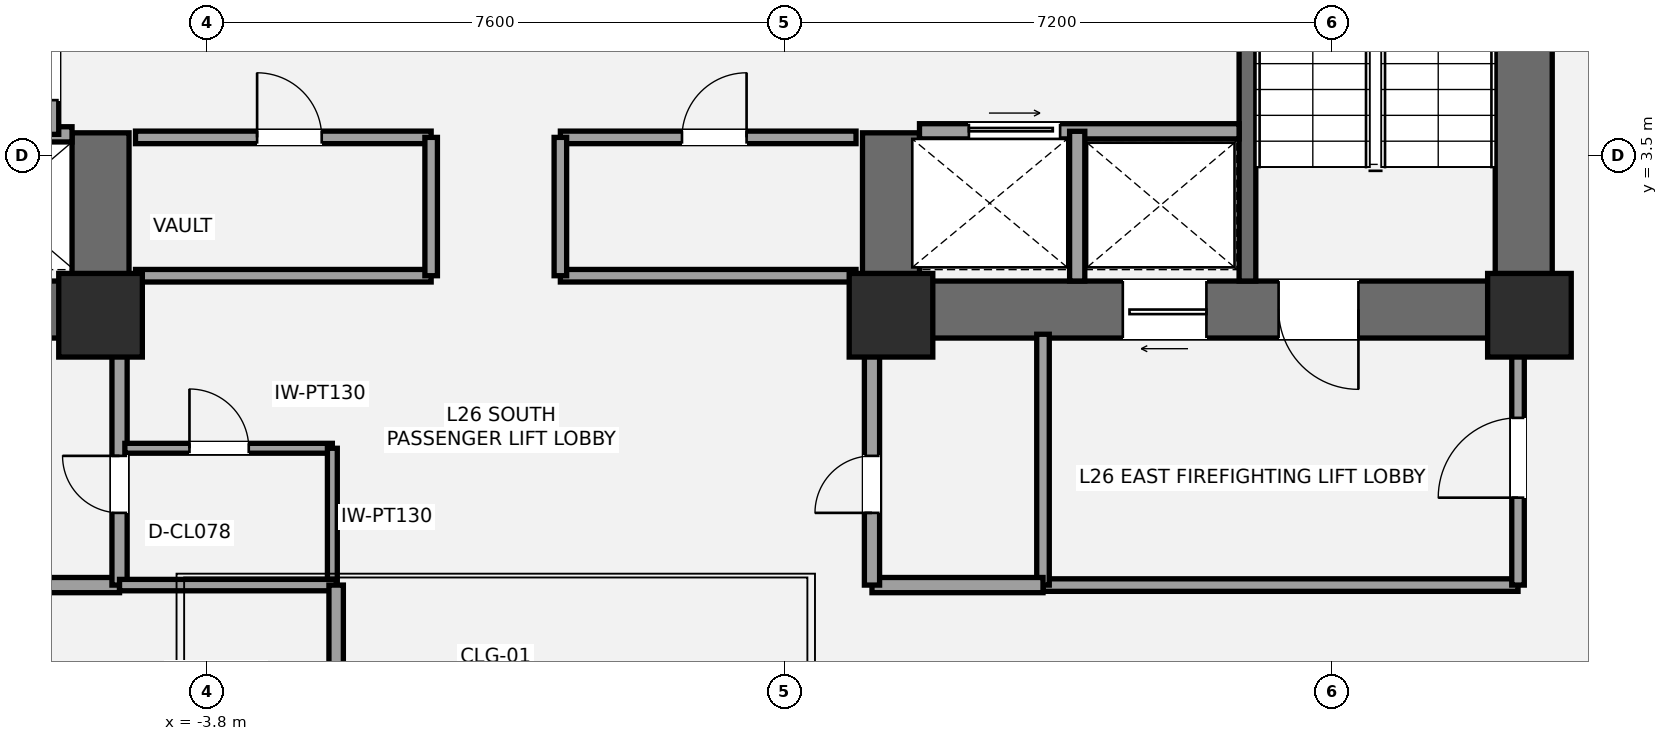
"""IFC4 building model, lengths in metres.
Left out: names, types, materials, properties, quantities, classifications, styles, units other than length and angle.
Written with IfcOpenShell. Run it as: python <this file> out.ifc"""

import sys

from ifc_helpers import new_model, si_unit, direction, frame, frame_2d, origin, origin_2d, place, context, subcontext, project, spatial, rectangle, extrude, element, fill, save


model = new_model("IFC4")
c1 = context("Model", 3, precision=1e-05, world=origin(), true_north=direction((0.0, 1.0)))
c2 = subcontext(c1, "Body", "Model", "MODEL_VIEW")
j1 = project(units=[si_unit("LENGTHUNIT", "METRE"), si_unit("PLANEANGLEUNIT", "RADIAN")], contexts=[c1])
p1 = place(None, origin())
s1 = spatial("IfcSite", under=j1, at=p1, CompositionType="ELEMENT")
p2 = place(p1, origin())
s2 = spatial("IfcBuilding", under=s1, at=p2, CompositionType="ELEMENT")
p3 = place(p2, frame((0.0, 0.0, 100.1)))
s3 = spatial("IfcBuildingStorey", under=s2, at=p3, CompositionType="ELEMENT", Elevation=100.1)
p4 = place(p3, frame((-4.825, 1.475, 0.0), z_axis=(0.0, 0.0, 1.0), x_axis=(-1.0, 0.0, 0.0)))
e1 = element("IfcWall", 1, at=p4, inside=s3, PredefinedType="SHEAR", context=c2, shape_type="SweptSolid", body=[
    extrude(rectangle(XDim=9.075, YDim=0.75, at=frame_2d((4.538, 0.0))), origin(), (0.0, 0.0, 1.0), 3.5),
])
p5 = place(p4, frame((5.475, 0.0, 0.0)))
e2 = element("IfcOpeningElement", 2, at=p5, cuts=e1, PredefinedType="OPENING", context=c2, shape_type="SweptSolid", body=[
    extrude(rectangle(XDim=1.05, YDim=2.15, at=frame_2d((0.525, 1.075))), frame((0.0, 0.385, 0.0), z_axis=(0.0, -1.0, 0.0), x_axis=(1.0, 0.0, 0.0)), (0.0, 0.0, 1.0), 0.77),
])
p6 = place(p4, frame((3.805, 0.0, 0.0)))
e3 = element("IfcOpeningElement", 3, at=p6, cuts=e1, PredefinedType="OPENING", context=c2, shape_type="SweptSolid", body=[
    extrude(rectangle(XDim=1.1, YDim=2.2, at=frame_2d((0.55, 1.1))), frame((0.0, 0.385, 0.0), z_axis=(0.0, -1.0, 0.0), x_axis=(1.0, 0.0, 0.0)), (0.0, 0.0, 1.0), 0.77),
])
p7 = place(p3, frame((-5.2, 1.1, 0.0), z_axis=(0.0, 0.0, 1.0), x_axis=(0.0, 1.0, 0.0)))
e4 = element("IfcWall", 4, at=p7, inside=s3, PredefinedType="SHEAR", context=c2, shape_type="SweptSolid", body=[
    extrude(rectangle(XDim=2.7, YDim=0.75, at=frame_2d((1.35, 0.0))), origin(), (0.0, 0.0, 1.0), 3.5),
])
p8 = place(p3, frame((13.525, 1.1, 0.0), z_axis=(0.0, 0.0, 1.0), x_axis=(0.0, 1.0, 0.0)))
e5 = element("IfcWall", 5, at=p8, inside=s3, PredefinedType="SHEAR", context=c2, shape_type="SweptSolid", body=[
    extrude(rectangle(XDim=8.65, YDim=0.75, at=frame_2d((4.325, 0.0))), origin(), (0.0, 0.0, 1.0), 3.5),
])
p9 = place(p3, frame((13.9, 1.475, 0.0), z_axis=(0.0, 0.0, 1.0), x_axis=(-1.0, 0.0, 0.0)))
e6 = element("IfcWall", 6, at=p9, inside=s3, PredefinedType="SHEAR", context=c2, shape_type="SweptSolid", body=[
    extrude(rectangle(XDim=9.075, YDim=0.75, at=frame_2d((4.538, 0.0))), origin(), (0.0, 0.0, 1.0), 3.5),
])
p10 = place(p9, frame((2.55, 0.0, 0.0)))
e7 = element("IfcOpeningElement", 7, at=p10, cuts=e6, PredefinedType="OPENING", context=c2, shape_type="SweptSolid", body=[
    extrude(rectangle(XDim=1.05, YDim=2.15, at=frame_2d((0.525, 1.075))), frame((0.0, 0.385, 0.0), z_axis=(0.0, -1.0, 0.0), x_axis=(1.0, 0.0, 0.0)), (0.0, 0.0, 1.0), 0.77),
])
p11 = place(p9, frame((4.55, 0.0, 0.0)))
e8 = element("IfcOpeningElement", 8, at=p11, cuts=e6, PredefinedType="OPENING", context=c2, shape_type="SweptSolid", body=[
    extrude(rectangle(XDim=1.1, YDim=2.2, at=frame_2d((0.55, 1.1))), frame((0.0, 0.385, 0.0), z_axis=(0.0, -1.0, 0.0), x_axis=(1.0, 0.0, 0.0)), (0.0, 0.0, 1.0), 0.77),
])
p12 = place(p3, frame((5.2, 1.1, 0.0), z_axis=(0.0, 0.0, 1.0), x_axis=(0.0, 1.0, 0.0)))
e9 = element("IfcWall", 9, at=p12, inside=s3, PredefinedType="SHEAR", context=c2, shape_type="SweptSolid", body=[
    extrude(rectangle(XDim=2.7, YDim=0.75, at=frame_2d((1.35, 0.0))), origin(), (0.0, 0.0, 1.0), 3.5),
])
p13 = place(p3, frame((9.89, 1.85, 0.0), z_axis=(0.0, 0.0, 1.0), x_axis=(0.0, 1.0, 0.0)))
e10 = element("IfcWall", 10, at=p13, inside=s3, PredefinedType="SHEAR", context=c2, shape_type="SweptSolid", body=[
    extrude(rectangle(XDim=7.15, YDim=0.22, at=frame_2d((3.575, 0.0))), origin(), (0.0, 0.0, 1.0), 3.5),
])
for number, where, z_axis, x_axis in (
    (11, (-5.2, 1.4, 0.0), (0.0, 0.0, 1.0), (1.0, 0.0, 0.0)),
    (12, (5.2, 1.4, 0.0), (0.0, 0.0, 1.0), (1.0, 0.0, 0.0)),
    (13, (13.6, 1.4, 0.0), (0.0, 0.0, 1.0), (1.0, 0.0, 0.0)),
):
    element("IfcColumn", number, at=place(p3, frame(where, z_axis=z_axis, x_axis=x_axis)), inside=s3, PredefinedType="COLUMN", context=c2, shape_type="SweptSolid", body=[
        extrude(rectangle(XDim=1.1, YDim=1.1, at=origin_2d()), origin(), (0.0, 0.0, 1.0), 3.5),
    ])
p14 = place(p3, frame((-7.2, -2.15, 0.0), z_axis=(0.0, 0.0, 1.0), x_axis=(1.0, 0.0, 0.0)))
e14 = element("IfcWall", 14, at=p14, inside=s3, PredefinedType="SOLIDWALL", context=c2, shape_type="SweptSolid", body=[
    extrude(rectangle(XDim=2.25, YDim=0.2, at=frame_2d((1.125, 0.0))), origin(), (0.0, 0.0, 1.0), 2.763),
])
p15 = place(p3, frame((-4.95, -2.15, 0.0), z_axis=(0.0, 0.0, 1.0), x_axis=(0.0, 1.0, 0.0)))
e15 = element("IfcWall", 15, at=p15, inside=s3, PredefinedType="SOLIDWALL", context=c2, shape_type="SweptSolid", body=[
    extrude(rectangle(XDim=3.3, YDim=0.2, at=frame_2d((1.65, 0.0))), origin(), (0.0, 0.0, 1.0), 2.763),
])
p16 = place(p15, frame((0.95, 0.0, 0.0)))
e16 = element("IfcOpeningElement", 16, at=p16, cuts=e15, PredefinedType="OPENING", context=c2, shape_type="SweptSolid", body=[
    extrude(rectangle(XDim=0.75, YDim=2.1, at=frame_2d((0.375, 1.05))), frame((0.0, 0.11, 0.0), z_axis=(0.0, -1.0, 0.0), x_axis=(1.0, 0.0, 0.0)), (0.0, 0.0, 1.0), 0.22),
])
p17 = place(p3, frame((7.2, -2.15, 0.0), z_axis=(0.0, 0.0, 1.0), x_axis=(1.0, 0.0, 0.0)))
e17 = element("IfcWall", 17, at=p17, inside=s3, PredefinedType="PARTITIONING", context=c2, shape_type="SweptSolid", body=[
    extrude(rectangle(XDim=6.25, YDim=0.165, at=frame_2d((3.125, 0.0))), origin(), (0.0, 0.0, 1.0), 3.31),
])
p18 = place(p3, frame((7.2, -2.15, 0.0), z_axis=(0.0, 0.0, 1.0), x_axis=(0.0, 1.0, 0.0)))
e18 = element("IfcWall", 18, at=p18, inside=s3, PredefinedType="PARTITIONING", context=c2, shape_type="SweptSolid", body=[
    extrude(rectangle(XDim=3.3, YDim=0.165, at=frame_2d((1.65, 0.0))), origin(), (0.0, 0.0, 1.0), 3.31),
])
p19 = place(p3, frame((13.45, -2.15, 0.0), z_axis=(0.0, 0.0, 1.0), x_axis=(0.0, 1.0, 0.0)))
e19 = element("IfcWall", 19, at=p19, inside=s3, PredefinedType="PARTITIONING", context=c2, shape_type="SweptSolid", body=[
    extrude(rectangle(XDim=3.3, YDim=0.165, at=frame_2d((1.65, 0.0))), origin(), (0.0, 0.0, 1.0), 2.763),
])
p20 = place(p19, frame((1.15, 0.0, 0.0)))
e20 = element("IfcOpeningElement", 20, at=p20, cuts=e19, PredefinedType="OPENING", context=c2, shape_type="SweptSolid", body=[
    extrude(rectangle(XDim=1.05, YDim=2.15, at=frame_2d((0.525, 1.075))), frame((0.0, 0.093, 0.0), z_axis=(0.0, -1.0, 0.0), x_axis=(1.0, 0.0, 0.0)), (0.0, 0.0, 1.0), 0.185),
])
p21 = place(p3, frame((4.95, -2.15, 0.0), z_axis=(0.0, 0.0, 1.0), x_axis=(1.0, 0.0, 0.0)))
e21 = element("IfcWall", 21, at=p21, inside=s3, PredefinedType="SOLIDWALL", context=c2, shape_type="SweptSolid", body=[
    extrude(rectangle(XDim=2.25, YDim=0.2, at=frame_2d((1.125, 0.0))), origin(), (0.0, 0.0, 1.0), 2.763),
])
p22 = place(p3, frame((4.95, -2.15, 0.0), z_axis=(0.0, 0.0, 1.0), x_axis=(0.0, 1.0, 0.0)))
e22 = element("IfcWall", 22, at=p22, inside=s3, PredefinedType="SOLIDWALL", context=c2, shape_type="SweptSolid", body=[
    extrude(rectangle(XDim=3.3, YDim=0.2, at=frame_2d((1.65, 0.0))), origin(), (0.0, 0.0, 1.0), 3.31),
])
p23 = place(p22, frame((0.95, 0.0, 0.0)))
e23 = element("IfcOpeningElement", 23, at=p23, cuts=e22, PredefinedType="OPENING", context=c2, shape_type="SweptSolid", body=[
    extrude(rectangle(XDim=0.75, YDim=2.1, at=frame_2d((0.375, 1.05))), frame((0.0, 0.11, 0.0), z_axis=(0.0, -1.0, 0.0), x_axis=(1.0, 0.0, 0.0)), (0.0, 0.0, 1.0), 0.22),
])
p24 = place(p3, frame((-4.88, -0.35, 0.0), z_axis=(0.0, 0.0, 1.0), x_axis=(1.0, 0.0, 0.0)))
e24 = element("IfcWall", 24, at=p24, inside=s3, PredefinedType="PARTITIONING", context=c2, shape_type="SweptSolid", body=[
    extrude(rectangle(XDim=2.73, YDim=0.13, at=frame_2d((1.365, 0.0))), origin(), (0.0, 0.0, 1.0), 2.763),
])
p25 = place(p24, frame((0.85, 0.0, 0.0)))
e25 = element("IfcOpeningElement", 25, at=p25, cuts=e24, PredefinedType="OPENING", context=c2, shape_type="SweptSolid", body=[
    extrude(rectangle(XDim=0.78, YDim=2.1, at=frame_2d((0.39, 1.05))), frame((0.0, 0.075, 0.0), z_axis=(0.0, -1.0, 0.0), x_axis=(1.0, 0.0, 0.0)), (0.0, 0.0, 1.0), 0.15),
])
p26 = place(p3, frame((-2.15, -2.15, 0.0), z_axis=(0.0, 0.0, 1.0), x_axis=(0.0, 1.0, 0.0)))
e26 = element("IfcWall", 26, at=p26, inside=s3, PredefinedType="PARTITIONING", context=c2, shape_type="SweptSolid", body=[
    extrude(rectangle(XDim=1.8, YDim=0.13, at=frame_2d((0.9, 0.0))), origin(), (0.0, 0.0, 1.0), 3.31),
])
p27 = place(p3, frame((-9.78, 3.78, 0.0), z_axis=(0.0, 0.0, 1.0), x_axis=(1.0, 0.0, 0.0)))
e27 = element("IfcWall", 27, at=p27, inside=s3, PredefinedType="SOLIDWALL", context=c2, shape_type="SweptSolid", body=[
    extrude(rectangle(XDim=4.205, YDim=0.2, at=frame_2d((2.103, 0.0))), origin(), (0.0, 0.0, 1.0), 3.31),
])
p28 = place(p3, frame((-5.85, 3.78, 0.0), z_axis=(0.0, 0.0, 1.0), x_axis=(0.0, 1.0, 0.0)))
e28 = element("IfcWall", 28, at=p28, inside=s3, PredefinedType="SOLIDWALL", context=c2, shape_type="SweptSolid", body=[
    extrude(rectangle(XDim=1.69, YDim=0.2, at=frame_2d((0.845, 0.0))), origin(), (0.0, 0.0, 1.0), 3.31),
])
p29 = place(p28, frame((0.45, 0.0, 0.0)))
e29 = element("IfcOpeningElement", 29, at=p29, cuts=e28, PredefinedType="OPENING", context=c2, shape_type="SweptSolid", body=[
    extrude(rectangle(XDim=0.75, YDim=2.1, at=frame_2d((0.375, 1.05))), frame((0.0, 0.11, 0.0), z_axis=(0.0, -1.0, 0.0), x_axis=(1.0, 0.0, 0.0)), (0.0, 0.0, 1.0), 0.22),
])
p30 = place(p3, frame((5.575, 3.82, 0.0), z_axis=(0.0, 0.0, 1.0), x_axis=(1.0, 0.0, 0.0)))
e30 = element("IfcWall", 30, at=p30, inside=s3, PredefinedType="SOLIDWALL", context=c2, shape_type="SweptSolid", body=[
    extrude(rectangle(XDim=4.205, YDim=0.2, at=frame_2d((2.103, 0.0))), origin(), (0.0, 0.0, 1.0), 3.31),
])
p31 = place(p30, frame((0.65, 0.0, 0.0)))
e31 = element("IfcOpeningElement", 31, at=p31, cuts=e30, PredefinedType="OPENING", context=c2, shape_type="SweptSolid", body=[
    extrude(rectangle(XDim=1.2, YDim=2.2, at=frame_2d((0.6, 1.1))), frame((0.0, 0.11, 0.0), z_axis=(0.0, -1.0, 0.0), x_axis=(1.0, 0.0, 0.0)), (0.0, 0.0, 1.0), 0.22),
])
p32 = place(p3, frame((7.65, 1.85, 0.0), z_axis=(0.0, 0.0, 1.0), x_axis=(0.0, 1.0, 0.0)))
e32 = element("IfcWall", 32, at=p32, inside=s3, PredefinedType="SOLIDWALL", context=c2, shape_type="SweptSolid", body=[
    extrude(rectangle(XDim=1.97, YDim=0.2, at=frame_2d((0.985, 0.0))), origin(), (0.0, 0.0, 1.0), 3.31),
])
p33 = place(p3, frame((-4.74, 1.92, 0.0), z_axis=(0.0, 0.0, 1.0), x_axis=(1.0, 0.0, 0.0)))
e33 = element("IfcWall", 33, at=p33, inside=s3, PredefinedType="PARTITIONING", context=c2, shape_type="SweptSolid", body=[
    extrude(rectangle(XDim=3.89, YDim=0.165, at=frame_2d((1.945, 0.0))), origin(), (0.0, 0.0, 1.0), 2.3),
])
p34 = place(p3, frame((-4.74, 3.74, 0.0), z_axis=(0.0, 0.0, 1.0), x_axis=(1.0, 0.0, 0.0)))
e34 = element("IfcWall", 34, at=p34, inside=s3, PredefinedType="PARTITIONING", context=c2, shape_type="SweptSolid", body=[
    extrude(rectangle(XDim=3.89, YDim=0.165, at=frame_2d((1.945, 0.0))), origin(), (0.0, 0.0, 1.0), 3.31),
])
p35 = place(p34, frame((1.6, 0.0, 0.0)))
e35 = element("IfcOpeningElement", 35, at=p35, cuts=e34, PredefinedType="OPENING", context=c2, shape_type="SweptSolid", body=[
    extrude(rectangle(XDim=0.85, YDim=2.1, at=frame_2d((0.425, 1.05))), frame((0.0, 0.093, 0.0), z_axis=(0.0, -1.0, 0.0), x_axis=(1.0, 0.0, 0.0)), (0.0, 0.0, 1.0), 0.185),
])
p36 = place(p3, frame((-0.85, 1.92, 0.0), z_axis=(0.0, 0.0, 1.0), x_axis=(0.0, 1.0, 0.0)))
e36 = element("IfcWall", 36, at=p36, inside=s3, PredefinedType="PARTITIONING", context=c2, shape_type="SweptSolid", body=[
    extrude(rectangle(XDim=1.82, YDim=0.165, at=frame_2d((0.91, 0.0))), origin(), (0.0, 0.0, 1.0), 3.31),
])
p37 = place(p3, frame((0.85, 1.92, 0.0), z_axis=(0.0, 0.0, 1.0), x_axis=(1.0, 0.0, 0.0)))
e37 = element("IfcWall", 37, at=p37, inside=s3, PredefinedType="PARTITIONING", context=c2, shape_type="SweptSolid", body=[
    extrude(rectangle(XDim=3.89, YDim=0.165, at=frame_2d((1.945, 0.0))), origin(), (0.0, 0.0, 1.0), 2.3),
])
p38 = place(p3, frame((0.85, 3.74, 0.0), z_axis=(0.0, 0.0, 1.0), x_axis=(1.0, 0.0, 0.0)))
e38 = element("IfcWall", 38, at=p38, inside=s3, PredefinedType="PARTITIONING", context=c2, shape_type="SweptSolid", body=[
    extrude(rectangle(XDim=3.89, YDim=0.165, at=frame_2d((1.945, 0.0))), origin(), (0.0, 0.0, 1.0), 3.31),
])
p39 = place(p38, frame((1.6, 0.0, 0.0)))
e39 = element("IfcOpeningElement", 39, at=p39, cuts=e38, PredefinedType="OPENING", context=c2, shape_type="SweptSolid", body=[
    extrude(rectangle(XDim=0.85, YDim=2.1, at=frame_2d((0.425, 1.05))), frame((0.0, 0.093, 0.0), z_axis=(0.0, -1.0, 0.0), x_axis=(1.0, 0.0, 0.0)), (0.0, 0.0, 1.0), 0.185),
])
p40 = place(p3, frame((0.85, 1.92, 0.0), z_axis=(0.0, 0.0, 1.0), x_axis=(0.0, 1.0, 0.0)))
e40 = element("IfcWall", 40, at=p40, inside=s3, PredefinedType="PARTITIONING", context=c2, shape_type="SweptSolid", body=[
    extrude(rectangle(XDim=1.82, YDim=0.165, at=frame_2d((0.91, 0.0))), origin(), (0.0, 0.0, 1.0), 3.31),
])
p41 = place(p3, frame((-4.95, -2.15, 0.0), z_axis=(0.0, 0.0, 1.0), x_axis=(1.0, 0.0, 0.0)))
e41 = element("IfcWall", 41, at=p41, inside=s3, PredefinedType="PLUMBINGWALL", context=c2, shape_type="SweptSolid", body=[
    extrude(rectangle(XDim=2.85, YDim=0.15, at=frame_2d((1.425, 0.0))), origin(), (0.0, 0.0, 1.0), 2.763),
])
p42 = place(p3, frame((-2.1, -4.05, 0.0), z_axis=(0.0, 0.0, 1.0), x_axis=(0.0, 1.0, 0.0)))
e42 = element("IfcWall", 42, at=p42, inside=s3, PredefinedType="PLUMBINGWALL", context=c2, shape_type="SweptSolid", body=[
    extrude(rectangle(XDim=1.9, YDim=0.19, at=frame_2d((0.95, 0.0))), origin(), (0.0, 0.0, 1.0), 3.31),
])
p43 = place(p10, origin())
e43 = element("IfcDoor", 43, at=p43, inside=s3, OperationType="SINGLE_SWING_LEFT", PredefinedType="DOOR", context=c2, shape_type="SweptSolid", body=[
    extrude(rectangle(XDim=1.05, YDim=2.15, at=frame_2d((0.525, 1.075))), frame((0.0, 0.025, 0.0), z_axis=(0.0, -1.0, 0.0), x_axis=(1.0, 0.0, 0.0)), (0.0, 0.0, 1.0), 0.05),
])
fill(e7, e43)
p44 = place(p16, origin())
e44 = element("IfcDoor", 44, at=p44, inside=s3, OperationType="SINGLE_SWING_RIGHT", PredefinedType="DOOR", context=c2, shape_type="SweptSolid", body=[
    extrude(rectangle(XDim=0.75, YDim=2.1, at=frame_2d((0.375, 1.05))), frame((0.0, 0.025, 0.0), z_axis=(0.0, -1.0, 0.0), x_axis=(1.0, 0.0, 0.0)), (0.0, 0.0, 1.0), 0.05),
])
fill(e16, e44)
p45 = place(p20, origin())
e45 = element("IfcDoor", 45, at=p45, inside=s3, OperationType="SINGLE_SWING_LEFT", PredefinedType="DOOR", context=c2, shape_type="SweptSolid", body=[
    extrude(rectangle(XDim=1.05, YDim=2.15, at=frame_2d((0.525, 1.075))), frame((0.0, 0.025, 0.0), z_axis=(0.0, -1.0, 0.0), x_axis=(1.0, 0.0, 0.0)), (0.0, 0.0, 1.0), 0.05),
])
fill(e20, e45)
p46 = place(p23, origin())
e46 = element("IfcDoor", 46, at=p46, inside=s3, OperationType="SINGLE_SWING_LEFT", PredefinedType="DOOR", context=c2, shape_type="SweptSolid", body=[
    extrude(rectangle(XDim=0.75, YDim=2.1, at=frame_2d((0.375, 1.05))), frame((0.0, 0.025, 0.0), z_axis=(0.0, -1.0, 0.0), x_axis=(1.0, 0.0, 0.0)), (0.0, 0.0, 1.0), 0.05),
])
fill(e23, e46)
p47 = place(p25, origin())
e47 = element("IfcDoor", 47, at=p47, inside=s3, OperationType="SINGLE_SWING_LEFT", PredefinedType="DOOR", context=c2, shape_type="SweptSolid", body=[
    extrude(rectangle(XDim=0.78, YDim=2.1, at=frame_2d((0.39, 1.05))), frame((0.0, 0.025, 0.0), z_axis=(0.0, -1.0, 0.0), x_axis=(1.0, 0.0, 0.0)), (0.0, 0.0, 1.0), 0.05),
])
fill(e25, e47)
p48 = place(p29, origin())
e48 = element("IfcDoor", 48, at=p48, inside=s3, OperationType="SINGLE_SWING_RIGHT", PredefinedType="DOOR", context=c2, shape_type="SweptSolid", body=[
    extrude(rectangle(XDim=0.75, YDim=2.1, at=frame_2d((0.375, 1.05))), frame((0.0, 0.025, 0.0), z_axis=(0.0, -1.0, 0.0), x_axis=(1.0, 0.0, 0.0)), (0.0, 0.0, 1.0), 0.05),
])
fill(e29, e48)
p49 = place(p11, origin())
e49 = element("IfcDoor", 49, at=p49, inside=s3, OperationType="SLIDING_TO_LEFT", PredefinedType="DOOR", context=c2, shape_type="SweptSolid", body=[
    extrude(rectangle(XDim=1.1, YDim=2.2, at=frame_2d((0.55, 1.1))), frame((0.0, 0.025, 0.0), z_axis=(0.0, -1.0, 0.0), x_axis=(1.0, 0.0, 0.0)), (0.0, 0.0, 1.0), 0.05),
])
fill(e8, e49)
p50 = place(p31, origin())
e50 = element("IfcDoor", 50, at=p50, inside=s3, OperationType="SLIDING_TO_RIGHT", PredefinedType="DOOR", context=c2, shape_type="SweptSolid", body=[
    extrude(rectangle(XDim=1.2, YDim=2.2, at=frame_2d((0.6, 1.1))), frame((0.0, 0.025, 0.0), z_axis=(0.0, -1.0, 0.0), x_axis=(1.0, 0.0, 0.0)), (0.0, 0.0, 1.0), 0.05),
])
fill(e31, e50)
p51 = place(p35, origin())
e51 = element("IfcDoor", 51, at=p51, inside=s3, OperationType="SINGLE_SWING_LEFT", PredefinedType="DOOR", context=c2, shape_type="SweptSolid", body=[
    extrude(rectangle(XDim=0.85, YDim=2.1, at=frame_2d((0.425, 1.05))), frame((0.0, 0.025, 0.0), z_axis=(0.0, -1.0, 0.0), x_axis=(1.0, 0.0, 0.0)), (0.0, 0.0, 1.0), 0.05),
])
fill(e35, e51)
p52 = place(p39, origin())
e52 = element("IfcDoor", 52, at=p52, inside=s3, OperationType="SINGLE_SWING_RIGHT", PredefinedType="DOOR", context=c2, shape_type="SweptSolid", body=[
    extrude(rectangle(XDim=0.85, YDim=2.1, at=frame_2d((0.425, 1.05))), frame((0.0, 0.025, 0.0), z_axis=(0.0, -1.0, 0.0), x_axis=(1.0, 0.0, 0.0)), (0.0, 0.0, 1.0), 0.05),
])
fill(e39, e52)
save(model, sys.argv[1])
